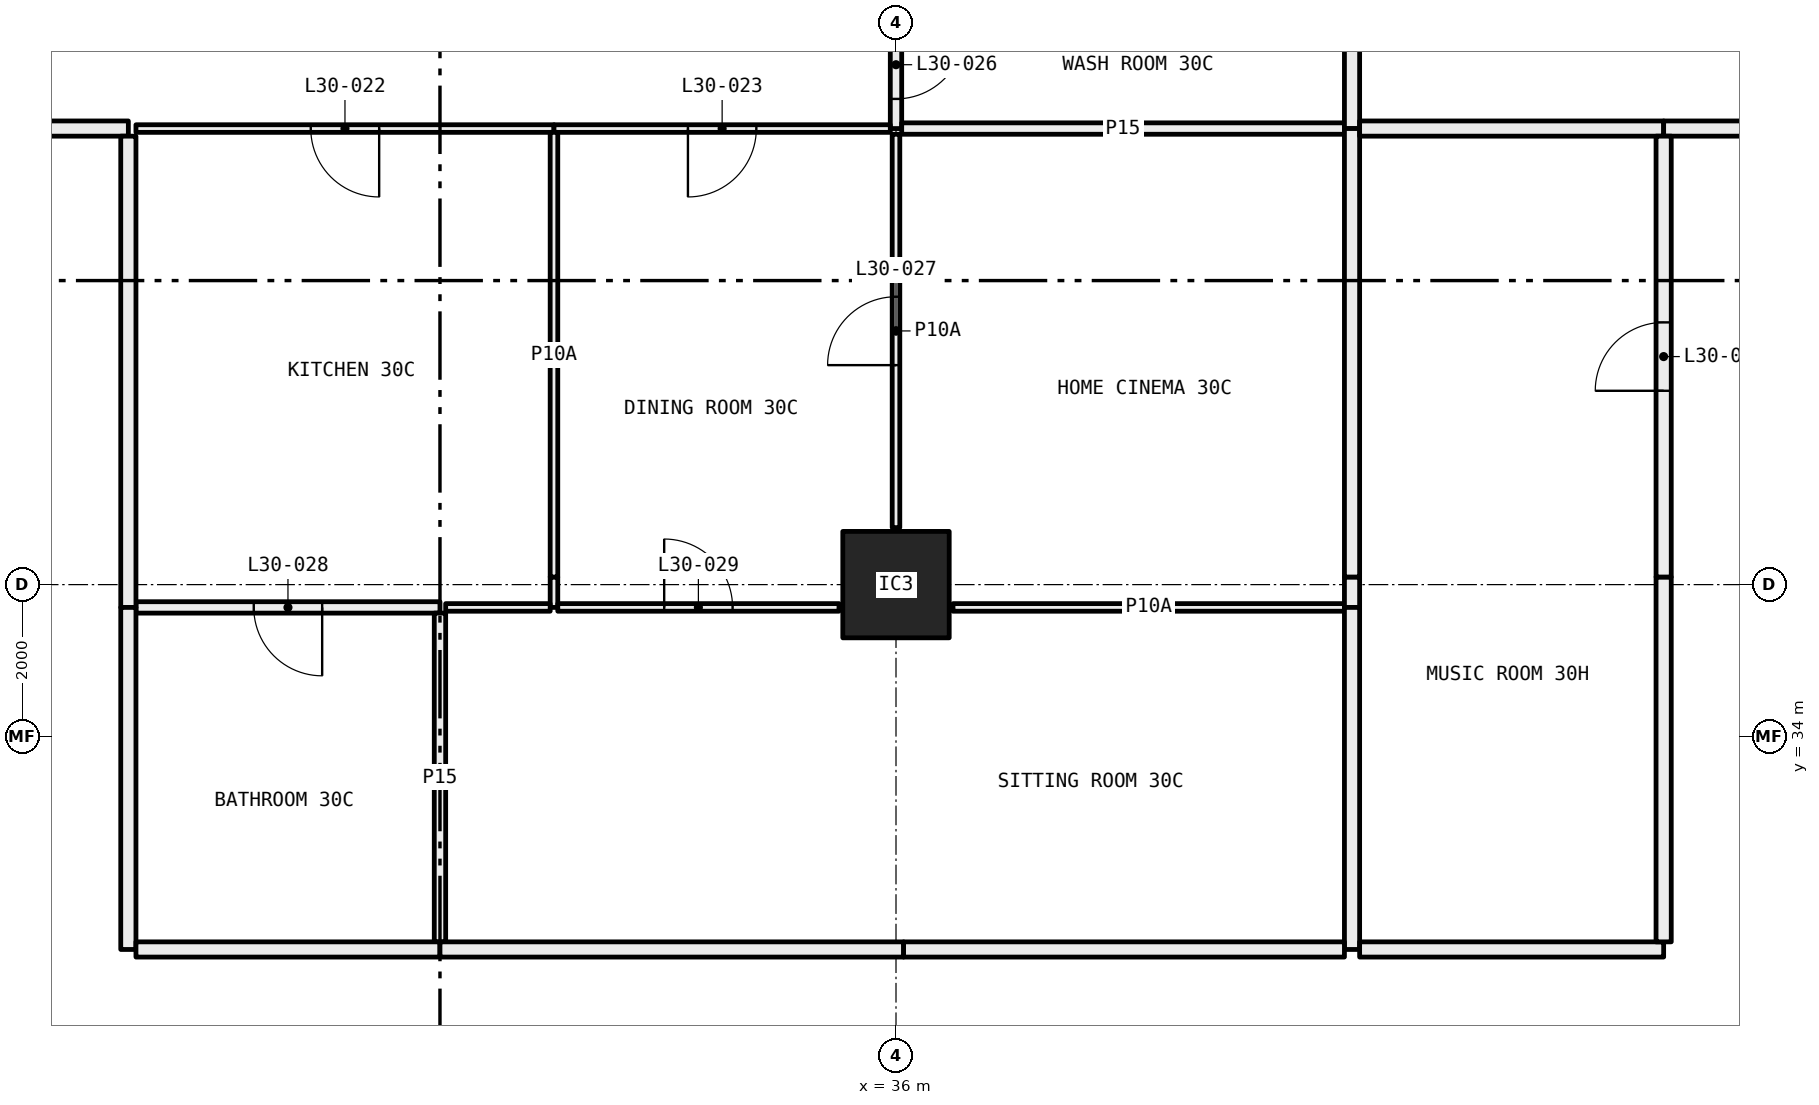
"""IFC4 building model, lengths in metres.
Left out: names, types, materials, properties, quantities, classifications, styles, units other than length and angle.
Written with IfcOpenShell. Run it as: python <this file> out.ifc"""

import sys

from ifc_helpers import new_model, si_unit, direction, frame, frame_2d, origin, origin_2d, place, context, subcontext, project, spatial, rectangle, hollow_rectangle, extrude, element, fill, save


model = new_model("IFC4")
c1 = context("Model", 3, precision=1e-05, world=origin(), true_north=direction((0.0, 1.0)))
c2 = subcontext(c1, "Body", "Model", "MODEL_VIEW")
j1 = project(units=[si_unit("LENGTHUNIT", "METRE"), si_unit("PLANEANGLEUNIT", "RADIAN")], contexts=[c1])
p1 = place(None, origin())
s1 = spatial("IfcSite", under=j1, at=p1, CompositionType="ELEMENT")
p2 = place(p1, origin())
s2 = spatial("IfcBuilding", under=s1, at=p2, CompositionType="ELEMENT")
p3 = place(p2, frame((0.0, 0.0, 117.3)))
s3 = spatial("IfcBuildingStorey", under=s2, at=p3, CompositionType="ELEMENT", Elevation=117.3)
p4 = place(p3, frame((36.0, 36.0, 0.0), z_axis=(0.0, 0.0, 1.0), x_axis=(1.0, 0.0, 0.0)))
e1 = element("IfcColumn", 1, at=p4, inside=s3, PredefinedType="COLUMN", context=c2, shape_type="SweptSolid", body=[
    extrude(hollow_rectangle(XDim=1.4, YDim=1.4, WallThickness=0.06, at=origin_2d()), origin(), (0.0, 0.0, 1.0), 3.05),
])
p5 = place(p3, frame((36.0, 42.0, 0.0), z_axis=(0.0, 0.0, 1.0), x_axis=(0.0, 1.0, 0.0)))
e2 = element("IfcWall", 2, at=p5, inside=s3, PredefinedType="PARTITIONING", context=c2, shape_type="SweptSolid", body=[
    extrude(rectangle(XDim=1.68, YDim=0.15, at=frame_2d((0.84, 0.0))), origin(), (0.0, 0.0, 1.0), 2.45),
])
p6 = place(p5, frame((0.39, 0.0, 0.0)))
e3 = element("IfcOpeningElement", 3, at=p6, cuts=e2, PredefinedType="OPENING", context=c2, shape_type="SweptSolid", body=[
    extrude(rectangle(XDim=0.9, YDim=2.1, at=frame_2d((0.45, 1.05))), frame((0.0, 0.085, 0.0), z_axis=(0.0, -1.0, 0.0), x_axis=(1.0, 0.0, 0.0)), (0.0, 0.0, 1.0), 0.17),
])
p7 = place(p3, frame((26.0, 42.0, 0.0), z_axis=(0.0, 0.0, 1.0), x_axis=(1.0, 0.0, 0.0)))
e4 = element("IfcWall", 4, at=p7, inside=s3, PredefinedType="PARTITIONING", context=c2, shape_type="SweptSolid", body=[
    extrude(rectangle(XDim=5.5, YDim=0.1, at=frame_2d((2.75, 0.0))), origin(), (0.0, 0.0, 1.0), 3.05),
])
p8 = place(p7, frame((2.3, 0.0, 0.0)))
e5 = element("IfcOpeningElement", 5, at=p8, cuts=e4, PredefinedType="OPENING", context=c2, shape_type="SweptSolid", body=[
    extrude(rectangle(XDim=0.9, YDim=2.1, at=frame_2d((0.45, 1.05))), frame((0.0, 0.06, 0.0), z_axis=(0.0, -1.0, 0.0), x_axis=(1.0, 0.0, 0.0)), (0.0, 0.0, 1.0), 0.12),
])
p9 = place(p3, frame((31.5, 42.0, 0.0), z_axis=(0.0, 0.0, 1.0), x_axis=(1.0, 0.0, 0.0)))
e6 = element("IfcWall", 6, at=p9, inside=s3, PredefinedType="PARTITIONING", context=c2, shape_type="SweptSolid", body=[
    extrude(rectangle(XDim=4.425, YDim=0.1, at=frame_2d((2.212, 0.0))), origin(), (0.0, 0.0, 1.0), 2.45),
])
p10 = place(p9, frame((1.762, 0.0, 0.0)))
e7 = element("IfcOpeningElement", 7, at=p10, cuts=e6, PredefinedType="OPENING", context=c2, shape_type="SweptSolid", body=[
    extrude(rectangle(XDim=0.9, YDim=2.1, at=frame_2d((0.45, 1.05))), frame((0.0, 0.06, 0.0), z_axis=(0.0, -1.0, 0.0), x_axis=(1.0, 0.0, 0.0)), (0.0, 0.0, 1.0), 0.12),
])
p11 = place(p3, frame((24.0, 42.0, 0.0), z_axis=(0.0, 0.0, 1.0), x_axis=(1.0, 0.0, 0.0)))
e8 = element("IfcWall", 8, at=p11, inside=s3, PredefinedType="PARTITIONING", context=c2, shape_type="SweptSolid", body=[
    extrude(rectangle(XDim=1.9, YDim=0.2, at=frame_2d((0.95, 0.0))), origin(), (0.0, 0.0, 1.0), 3.05),
])
p12 = place(p3, frame((36.075, 42.0, 0.0), z_axis=(0.0, 0.0, 1.0), x_axis=(1.0, 0.0, 0.0)))
e9 = element("IfcWall", 9, at=p12, inside=s3, PredefinedType="PARTITIONING", context=c2, shape_type="SweptSolid", body=[
    extrude(rectangle(XDim=5.825, YDim=0.15, at=frame_2d((2.913, 0.0))), origin(), (0.0, 0.0, 1.0), 2.45),
])
p13 = place(p3, frame((42.0, 42.0, 0.0), z_axis=(0.0, 0.0, 1.0), x_axis=(0.0, 1.0, 0.0)))
e10 = element("IfcWall", 10, at=p13, inside=s3, PredefinedType="PARTITIONING", context=c2, shape_type="SweptSolid", body=[
    extrude(rectangle(XDim=1.68, YDim=0.2, at=frame_2d((0.84, 0.0))), origin(), (0.0, 0.0, 1.0), 3.05),
])
p14 = place(p3, frame((31.5, 35.7, 0.0), z_axis=(0.0, 0.0, 1.0), x_axis=(0.0, 1.0, 0.0)))
e11 = element("IfcWall", 11, at=p14, inside=s3, PredefinedType="PARTITIONING", context=c2, shape_type="SweptSolid", body=[
    extrude(rectangle(XDim=0.4, YDim=0.1, at=frame_2d((0.2, 0.0))), origin(), (0.0, 0.0, 1.0), 2.45),
])
p15 = place(p3, frame((31.5, 36.1, 0.0), z_axis=(0.0, 0.0, 1.0), x_axis=(0.0, 1.0, 0.0)))
e12 = element("IfcWall", 12, at=p15, inside=s3, PredefinedType="PARTITIONING", context=c2, shape_type="SweptSolid", body=[
    extrude(rectangle(XDim=5.85, YDim=0.1, at=frame_2d((2.925, 0.0))), origin(), (0.0, 0.0, 1.0), 3.05),
])
p16 = place(p3, frame((26.0, 35.7, 0.0), z_axis=(0.0, 0.0, 1.0), x_axis=(1.0, 0.0, 0.0)))
e13 = element("IfcWall", 13, at=p16, inside=s3, PredefinedType="PARTITIONING", context=c2, shape_type="SweptSolid", body=[
    extrude(rectangle(XDim=4.0, YDim=0.15, at=frame_2d((2.0, 0.0))), origin(), (0.0, 0.0, 1.0), 3.05),
])
p17 = place(p16, frame((1.55, 0.0, 0.0)))
e14 = element("IfcOpeningElement", 14, at=p17, cuts=e13, PredefinedType="OPENING", context=c2, shape_type="SweptSolid", body=[
    extrude(rectangle(XDim=0.9, YDim=2.1, at=frame_2d((0.45, 1.05))), frame((0.0, 0.085, 0.0), z_axis=(0.0, -1.0, 0.0), x_axis=(1.0, 0.0, 0.0)), (0.0, 0.0, 1.0), 0.17),
])
p18 = place(p3, frame((30.075, 35.7, 0.0), z_axis=(0.0, 0.0, 1.0), x_axis=(1.0, 0.0, 0.0)))
e15 = element("IfcWall", 15, at=p18, inside=s3, PredefinedType="PARTITIONING", context=c2, shape_type="SweptSolid", body=[
    extrude(rectangle(XDim=1.375, YDim=0.1, at=frame_2d((0.688, 0.0))), origin(), (0.0, 0.0, 1.0), 3.05),
])
p19 = place(p3, frame((25.9, 41.9, 0.0), z_axis=(0.0, 0.0, 1.0), x_axis=(0.0, -1.0, 0.0)))
e16 = element("IfcWall", 16, at=p19, inside=s3, PredefinedType="PARTITIONING", context=c2, shape_type="SweptSolid", body=[
    extrude(rectangle(XDim=6.2, YDim=0.2, at=frame_2d((3.1, 0.0))), origin(), (0.0, 0.0, 1.0), 2.45),
])
p20 = place(p3, frame((36.0, 36.75, 0.0), z_axis=(0.0, 0.0, 1.0), x_axis=(0.0, 1.0, 0.0)))
e17 = element("IfcWall", 17, at=p20, inside=s3, PredefinedType="PARTITIONING", context=c2, shape_type="SweptSolid", body=[
    extrude(rectangle(XDim=5.175, YDim=0.1, at=frame_2d((2.587, 0.0))), origin(), (0.0, 0.0, 1.0), 2.45),
])
p21 = place(p20, frame((2.137, 0.0, 0.0)))
e18 = element("IfcOpeningElement", 18, at=p21, cuts=e17, PredefinedType="OPENING", context=c2, shape_type="SweptSolid", body=[
    extrude(rectangle(XDim=0.9, YDim=2.1, at=frame_2d((0.45, 1.05))), frame((0.0, 0.06, 0.0), z_axis=(0.0, -1.0, 0.0), x_axis=(1.0, 0.0, 0.0)), (0.0, 0.0, 1.0), 0.12),
])
p22 = place(p3, frame((31.55, 35.7, 0.0), z_axis=(0.0, 0.0, 1.0), x_axis=(1.0, 0.0, 0.0)))
e19 = element("IfcWall", 19, at=p22, inside=s3, PredefinedType="PARTITIONING", context=c2, shape_type="SweptSolid", body=[
    extrude(rectangle(XDim=3.7, YDim=0.1, at=frame_2d((1.85, 0.0))), origin(), (0.0, 0.0, 1.0), 3.05),
])
p23 = place(p22, frame((1.4, 0.0, 0.0)))
e20 = element("IfcOpeningElement", 20, at=p23, cuts=e19, PredefinedType="OPENING", context=c2, shape_type="SweptSolid", body=[
    extrude(rectangle(XDim=0.9, YDim=2.1, at=frame_2d((0.45, 1.05))), frame((0.0, 0.06, 0.0), z_axis=(0.0, -1.0, 0.0), x_axis=(1.0, 0.0, 0.0)), (0.0, 0.0, 1.0), 0.12),
])
p24 = place(p3, frame((36.75, 35.7, 0.0), z_axis=(0.0, 0.0, 1.0), x_axis=(1.0, 0.0, 0.0)))
e21 = element("IfcWall", 21, at=p24, inside=s3, PredefinedType="PARTITIONING", context=c2, shape_type="SweptSolid", body=[
    extrude(rectangle(XDim=5.15, YDim=0.1, at=frame_2d((2.575, 0.0))), origin(), (0.0, 0.0, 1.0), 3.05),
])
p25 = place(p3, frame((42.0, 35.7, 0.0), z_axis=(0.0, 0.0, 1.0), x_axis=(0.0, 1.0, 0.0)))
e22 = element("IfcWall", 22, at=p25, inside=s3, PredefinedType="PARTITIONING", context=c2, shape_type="SweptSolid", body=[
    extrude(rectangle(XDim=0.4, YDim=0.2, at=frame_2d((0.2, 0.0))), origin(), (0.0, 0.0, 1.0), 2.45),
])
p26 = place(p3, frame((42.0, 36.1, 0.0), z_axis=(0.0, 0.0, 1.0), x_axis=(0.0, 1.0, 0.0)))
e23 = element("IfcWall", 23, at=p26, inside=s3, PredefinedType="PARTITIONING", context=c2, shape_type="SweptSolid", body=[
    extrude(rectangle(XDim=5.9, YDim=0.2, at=frame_2d((2.95, 0.0))), origin(), (0.0, 0.0, 1.0), 3.05),
])
p27 = place(p3, frame((30.0, 31.3, 0.0), z_axis=(0.0, 0.0, 1.0), x_axis=(0.0, 1.0, 0.0)))
e24 = element("IfcWall", 24, at=p27, inside=s3, PredefinedType="PARTITIONING", context=c2, shape_type="SweptSolid", body=[
    extrude(rectangle(XDim=4.325, YDim=0.15, at=frame_2d((2.163, 0.0))), origin(), (0.0, 0.0, 1.0), 3.05),
])
p28 = place(p3, frame((25.9, 35.7, 0.0), z_axis=(0.0, 0.0, 1.0), x_axis=(0.0, -1.0, 0.0)))
e25 = element("IfcWall", 25, at=p28, inside=s3, PredefinedType="PARTITIONING", context=c2, shape_type="SweptSolid", body=[
    extrude(rectangle(XDim=4.5, YDim=0.2, at=frame_2d((2.25, 0.0))), origin(), (0.0, 0.0, 1.0), 3.05),
])
p29 = place(p3, frame((26.0, 31.2, 0.0), z_axis=(0.0, 0.0, 1.0), x_axis=(1.0, 0.0, 0.0)))
e26 = element("IfcWall", 26, at=p29, inside=s3, PredefinedType="PARTITIONING", context=c2, shape_type="SweptSolid", body=[
    extrude(rectangle(XDim=4.0, YDim=0.2, at=frame_2d((2.0, 0.0))), origin(), (0.0, 0.0, 1.0), 3.05),
])
p30 = place(p3, frame((42.0, 31.2, 0.0), z_axis=(0.0, 0.0, 1.0), x_axis=(0.0, 1.0, 0.0)))
e27 = element("IfcWall", 27, at=p30, inside=s3, PredefinedType="PARTITIONING", context=c2, shape_type="SweptSolid", body=[
    extrude(rectangle(XDim=4.5, YDim=0.2, at=frame_2d((2.25, 0.0))), origin(), (0.0, 0.0, 1.0), 3.05),
])
p31 = place(p3, frame((30.0, 31.2, 0.0), z_axis=(0.0, 0.0, 1.0), x_axis=(1.0, 0.0, 0.0)))
e28 = element("IfcWall", 28, at=p31, inside=s3, PredefinedType="PARTITIONING", context=c2, shape_type="SweptSolid", body=[
    extrude(rectangle(XDim=6.1, YDim=0.2, at=frame_2d((3.05, 0.0))), origin(), (0.0, 0.0, 1.0), 2.45),
])
p32 = place(p3, frame((36.1, 31.2, 0.0), z_axis=(0.0, 0.0, 1.0), x_axis=(1.0, 0.0, 0.0)))
e29 = element("IfcWall", 29, at=p32, inside=s3, PredefinedType="PARTITIONING", context=c2, shape_type="SweptSolid", body=[
    extrude(rectangle(XDim=5.8, YDim=0.2, at=frame_2d((2.9, 0.0))), origin(), (0.0, 0.0, 1.0), 3.05),
])
p33 = place(p3, frame((42.1, 42.0, 0.0), z_axis=(0.0, 0.0, 1.0), x_axis=(1.0, 0.0, 0.0)))
e30 = element("IfcWall", 30, at=p33, inside=s3, PredefinedType="PARTITIONING", context=c2, shape_type="SweptSolid", body=[
    extrude(rectangle(XDim=4.0, YDim=0.2, at=frame_2d((2.0, 0.0))), origin(), (0.0, 0.0, 1.0), 3.05),
])
p34 = place(p3, frame((46.1, 42.0, 0.0), z_axis=(0.0, 0.0, 1.0), x_axis=(1.0, 0.0, 0.0)))
e31 = element("IfcWall", 31, at=p34, inside=s3, PredefinedType="PARTITIONING", context=c2, shape_type="SweptSolid", body=[
    extrude(rectangle(XDim=1.9, YDim=0.2, at=frame_2d((0.95, 0.0))), origin(), (0.0, 0.0, 1.0), 3.05),
])
p35 = place(p3, frame((42.1, 31.2, 0.0), z_axis=(0.0, 0.0, 1.0), x_axis=(1.0, 0.0, 0.0)))
e32 = element("IfcWall", 32, at=p35, inside=s3, PredefinedType="PARTITIONING", context=c2, shape_type="SweptSolid", body=[
    extrude(rectangle(XDim=4.0, YDim=0.2, at=frame_2d((2.0, 0.0))), origin(), (0.0, 0.0, 1.0), 3.05),
])
p36 = place(p3, frame((46.1, 31.3, 0.0), z_axis=(0.0, 0.0, 1.0), x_axis=(0.0, 1.0, 0.0)))
e33 = element("IfcWall", 33, at=p36, inside=s3, PredefinedType="PARTITIONING", context=c2, shape_type="SweptSolid", body=[
    extrude(rectangle(XDim=4.8, YDim=0.2, at=frame_2d((2.4, 0.0))), origin(), (0.0, 0.0, 1.0), 2.45),
])
p37 = place(p3, frame((46.1, 36.1, 0.0), z_axis=(0.0, 0.0, 1.0), x_axis=(0.0, 1.0, 0.0)))
e34 = element("IfcWall", 34, at=p37, inside=s3, PredefinedType="PARTITIONING", context=c2, shape_type="SweptSolid", body=[
    extrude(rectangle(XDim=5.8, YDim=0.2, at=frame_2d((2.9, 0.0))), origin(), (0.0, 0.0, 1.0), 3.05),
])
p38 = place(p37, frame((2.45, 0.0, 0.0)))
e35 = element("IfcOpeningElement", 35, at=p38, cuts=e34, PredefinedType="OPENING", context=c2, shape_type="SweptSolid", body=[
    extrude(rectangle(XDim=0.9, YDim=2.1, at=frame_2d((0.45, 1.05))), frame((0.0, 0.11, 0.0), z_axis=(0.0, -1.0, 0.0), x_axis=(1.0, 0.0, 0.0)), (0.0, 0.0, 1.0), 0.22),
])
p39 = place(p8, frame((0.9, 0.0, 0.0), x_axis=(-1.0, 0.0, 0.0)))
e36 = element("IfcDoor", 36, at=p39, inside=s3, OperationType="SINGLE_SWING_RIGHT", PredefinedType="DOOR", context=c2, shape_type="SweptSolid", body=[
    extrude(rectangle(XDim=0.9, YDim=2.1, at=frame_2d((0.45, 1.05))), frame((0.0, 0.025, 0.0), z_axis=(0.0, -1.0, 0.0), x_axis=(1.0, 0.0, 0.0)), (0.0, 0.0, 1.0), 0.05),
])
fill(e5, e36)
p40 = place(p10, frame((0.9, 0.0, 0.0), x_axis=(-1.0, 0.0, 0.0)))
e37 = element("IfcDoor", 37, at=p40, inside=s3, OperationType="SINGLE_SWING_LEFT", PredefinedType="DOOR", context=c2, shape_type="SweptSolid", body=[
    extrude(rectangle(XDim=0.9, YDim=2.1, at=frame_2d((0.45, 1.05))), frame((0.0, 0.025, 0.0), z_axis=(0.0, -1.0, 0.0), x_axis=(1.0, 0.0, 0.0)), (0.0, 0.0, 1.0), 0.05),
])
fill(e7, e37)
p41 = place(p6, frame((0.9, 0.0, 0.0), x_axis=(-1.0, 0.0, 0.0)))
e38 = element("IfcDoor", 38, at=p41, inside=s3, OperationType="SINGLE_SWING_RIGHT", PredefinedType="DOOR", context=c2, shape_type="SweptSolid", body=[
    extrude(rectangle(XDim=0.9, YDim=2.1, at=frame_2d((0.45, 1.05))), frame((0.0, 0.025, 0.0), z_axis=(0.0, -1.0, 0.0), x_axis=(1.0, 0.0, 0.0)), (0.0, 0.0, 1.0), 0.05),
])
fill(e3, e38)
p42 = place(p21, origin())
e39 = element("IfcDoor", 39, at=p42, inside=s3, OperationType="SINGLE_SWING_RIGHT", PredefinedType="DOOR", context=c2, shape_type="SweptSolid", body=[
    extrude(rectangle(XDim=0.9, YDim=2.1, at=frame_2d((0.45, 1.05))), frame((0.0, 0.025, 0.0), z_axis=(0.0, -1.0, 0.0), x_axis=(1.0, 0.0, 0.0)), (0.0, 0.0, 1.0), 0.05),
])
fill(e18, e39)
p43 = place(p17, frame((0.9, 0.0, 0.0), x_axis=(-1.0, 0.0, 0.0)))
e40 = element("IfcDoor", 40, at=p43, inside=s3, OperationType="SINGLE_SWING_RIGHT", PredefinedType="DOOR", context=c2, shape_type="SweptSolid", body=[
    extrude(rectangle(XDim=0.9, YDim=2.1, at=frame_2d((0.45, 1.05))), frame((0.0, 0.025, 0.0), z_axis=(0.0, -1.0, 0.0), x_axis=(1.0, 0.0, 0.0)), (0.0, 0.0, 1.0), 0.05),
])
fill(e14, e40)
p44 = place(p23, origin())
e41 = element("IfcDoor", 41, at=p44, inside=s3, OperationType="SINGLE_SWING_RIGHT", PredefinedType="DOOR", context=c2, shape_type="SweptSolid", body=[
    extrude(rectangle(XDim=0.9, YDim=2.1, at=frame_2d((0.45, 1.05))), frame((0.0, 0.025, 0.0), z_axis=(0.0, -1.0, 0.0), x_axis=(1.0, 0.0, 0.0)), (0.0, 0.0, 1.0), 0.05),
])
fill(e20, e41)
p45 = place(p38, origin())
e42 = element("IfcDoor", 42, at=p45, inside=s3, OperationType="SINGLE_SWING_RIGHT", PredefinedType="DOOR", context=c2, shape_type="SweptSolid", body=[
    extrude(rectangle(XDim=0.9, YDim=2.1, at=frame_2d((0.45, 1.05))), frame((0.0, 0.025, 0.0), z_axis=(0.0, -1.0, 0.0), x_axis=(1.0, 0.0, 0.0)), (0.0, 0.0, 1.0), 0.05),
])
fill(e35, e42)
save(model, sys.argv[1])
